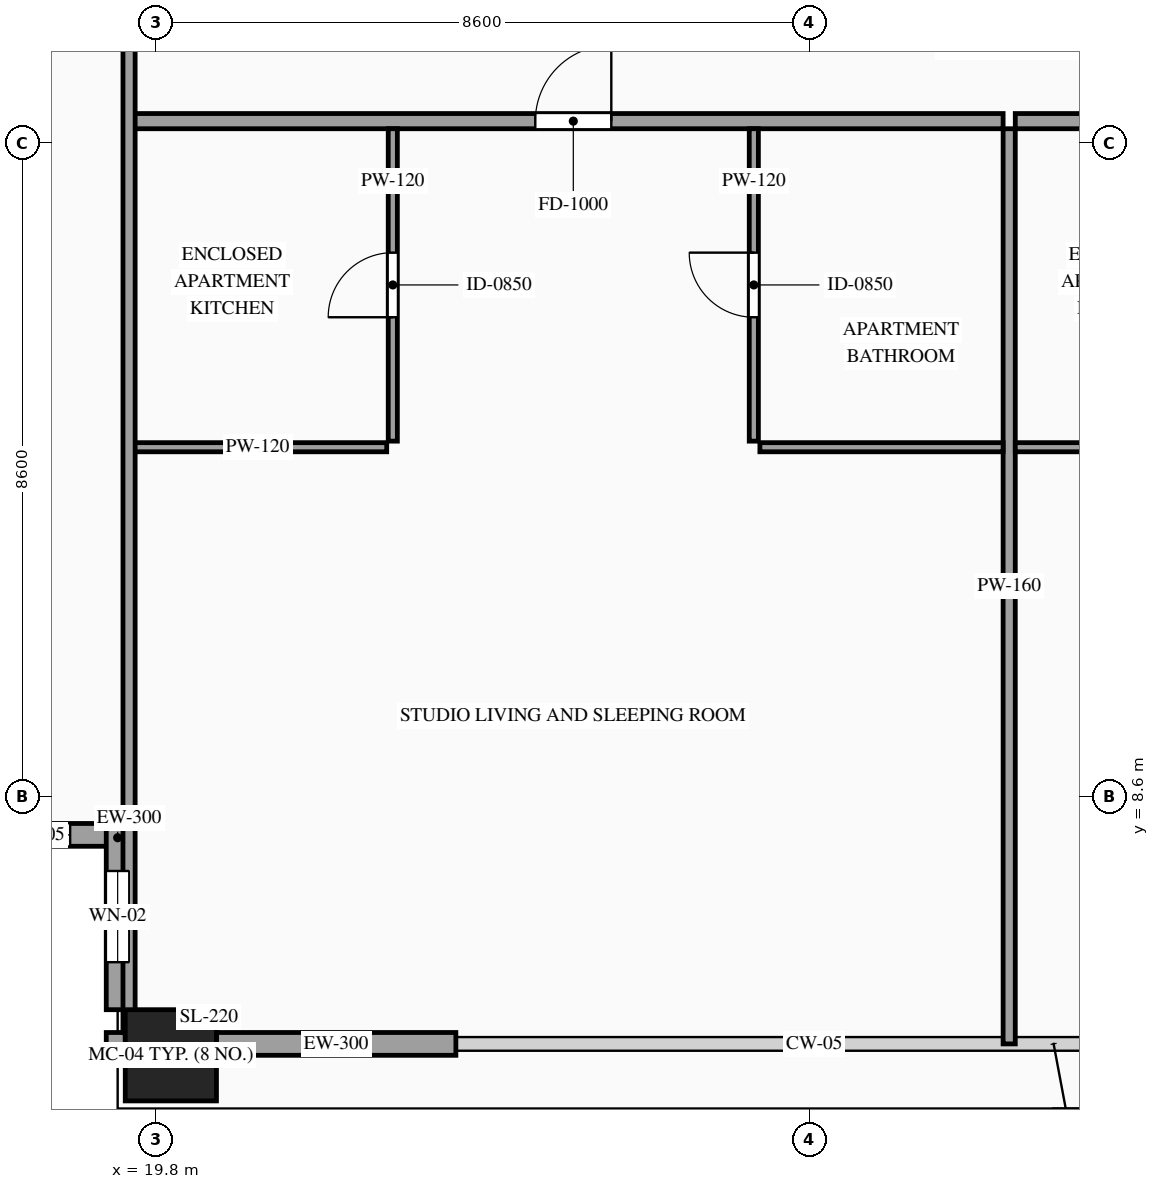
"""IFC4 building model, lengths in metres.
Left out: names, types, materials, properties, quantities, classifications, styles, units other than length and angle.
Written with IfcOpenShell. Run it as: python <this file> out.ifc"""

import sys

from ifc_helpers import new_model, si_unit, direction, frame, frame_2d, origin, origin_2d, place, context, subcontext, project, spatial, rectangle, hollow_rectangle, extrude, source, transform, mapped, element, fill, save


model = new_model("IFC4")
c1 = context("Model", 3, precision=1e-05, world=origin(), true_north=direction((0.0, 1.0)))
c2 = subcontext(c1, "Body", "Model", "MODEL_VIEW")
j1 = project(units=[si_unit("LENGTHUNIT", "METRE"), si_unit("PLANEANGLEUNIT", "RADIAN")], contexts=[c1])
p1 = place(None, origin())
s1 = spatial("IfcSite", under=j1, at=p1, CompositionType="ELEMENT")
p2 = place(p1, origin())
s2 = spatial("IfcBuilding", under=s1, at=p2, CompositionType="ELEMENT")
p3 = place(p2, frame((0.0, 0.0, 234.6)))
s3 = spatial("IfcBuildingStorey", under=s2, at=p3, CompositionType="ELEMENT", Elevation=234.6)
m1 = source(origin(), c2, "Body", "SweptSolid", [
    extrude(hollow_rectangle(XDim=1.2, YDim=1.2, WallThickness=0.055, at=origin_2d()), origin(), (0.0, 0.0, 1.0), 3.5),
])
p4 = place(p3, frame((20.0, 5.2, 0.0), z_axis=(0.0, 0.0, 1.0), x_axis=(1.0, 0.0, 0.0)))
e1 = element("IfcColumn", 1, at=p4, inside=s3, PredefinedType="COLUMN", context=c2, shape_type="MappedRepresentation", body=[
    mapped(m1, transform((0.0, 0.0, 0.0), scale=1.0)),
])
p5 = place(p3, frame((17.0, 8.1, 0.0), z_axis=(0.0, 0.0, 1.0), x_axis=(1.0, 0.0, 0.0)))
e2 = element("IfcWall", 2, at=p5, inside=s3, PredefinedType="SOLIDWALL", context=c2, shape_type="SweptSolid", body=[
    extrude(rectangle(XDim=2.45, YDim=0.3, at=frame_2d((1.225, 0.0))), origin(), (0.0, 0.0, 1.0), 3.28),
])
p6 = place(p5, frame((0.775, 0.0, 0.85)))
e3 = element("IfcOpeningElement", 3, at=p6, cuts=e2, PredefinedType="OPENING", context=c2, shape_type="SweptSolid", body=[
    extrude(rectangle(XDim=0.9, YDim=1.5, at=frame_2d((0.45, 0.75))), frame((0.0, 0.165, 0.0), z_axis=(0.0, -1.0, 0.0), x_axis=(1.0, 0.0, 0.0)), (0.0, 0.0, 1.0), 0.33),
])
p7 = place(p3, frame((19.3, 8.25, 0.0), z_axis=(0.0, 0.0, 1.0), x_axis=(0.0, -1.0, 0.0)))
e4 = element("IfcWall", 4, at=p7, inside=s3, PredefinedType="SOLIDWALL", context=c2, shape_type="SweptSolid", body=[
    extrude(rectangle(XDim=2.45, YDim=0.3, at=frame_2d((1.225, 0.0))), origin(), (0.0, 0.0, 1.0), 3.28),
])
p8 = place(p7, frame((0.625, 0.0, 0.85)))
e5 = element("IfcOpeningElement", 5, at=p8, cuts=e4, PredefinedType="OPENING", context=c2, shape_type="SweptSolid", body=[
    extrude(rectangle(XDim=1.2, YDim=2.1, at=frame_2d((0.6, 1.05))), frame((0.0, 0.165, 0.0), z_axis=(0.0, -1.0, 0.0), x_axis=(1.0, 0.0, 0.0)), (0.0, 0.0, 1.0), 0.33),
])
m2 = source(origin(), c2, "Body", "SweptSolid", [
    extrude(rectangle(XDim=0.25, YDim=0.3, at=frame_2d((0.125, 0.0))), origin(), (0.0, 0.0, 1.0), 3.28),
])
p9 = place(p3, frame((19.15, 5.35, 0.0), z_axis=(0.0, 0.0, 1.0), x_axis=(1.0, 0.0, 0.0)))
e6 = element("IfcWall", 6, at=p9, inside=s3, PredefinedType="SOLIDWALL", context=c2, shape_type="MappedRepresentation", body=[
    mapped(m2, transform((0.0, 0.0, 0.0), scale=1.0)),
])
m3 = source(origin(), c2, "Body", "SweptSolid", [
    extrude(rectangle(XDim=3.15, YDim=0.3, at=frame_2d((1.575, 0.0))), origin(), (0.0, 0.0, 1.0), 2.835),
])
p10 = place(p3, frame((20.6, 5.35, 0.0), z_axis=(0.0, 0.0, 1.0), x_axis=(1.0, 0.0, 0.0)))
e7 = element("IfcWall", 7, at=p10, inside=s3, PredefinedType="SOLIDWALL", context=c2, shape_type="MappedRepresentation", body=[
    mapped(m3, transform((0.0, 0.0, 0.0), scale=1.0)),
])
p11 = place(p3, frame((19.44, 17.49, 0.0), z_axis=(0.0, 0.0, 1.0), x_axis=(1.0, 0.0, 0.0)))
e8 = element("IfcWall", 8, at=p11, inside=s3, PredefinedType="PARTITIONING", context=c2, shape_type="SweptSolid", body=[
    extrude(rectangle(XDim=11.51, YDim=0.2, at=frame_2d((5.755, 0.0))), origin(), (0.0, 0.0, 1.0), 3.28),
])
p12 = place(p11, frame((5.355, 0.0, 0.0)))
e9 = element("IfcOpeningElement", 9, at=p12, cuts=e8, PredefinedType="OPENING", context=c2, shape_type="SweptSolid", body=[
    extrude(rectangle(XDim=1.0, YDim=2.2, at=frame_2d((0.5, 1.1))), frame((0.0, 0.115, 0.0), z_axis=(0.0, -1.0, 0.0), x_axis=(1.0, 0.0, 0.0)), (0.0, 0.0, 1.0), 0.23),
])
m4 = source(origin(), c2, "Body", "SweptSolid", [
    extrude(rectangle(XDim=12.04, YDim=0.16, at=frame_2d((6.02, 0.0))), origin(), (0.0, 0.0, 1.0), 3.28),
])
p13 = place(p3, frame((31.03, 5.35, 0.0), z_axis=(0.0, 0.0, 1.0), x_axis=(0.0, 1.0, 0.0)))
e10 = element("IfcWall", 10, at=p13, inside=s3, PredefinedType="PARTITIONING", context=c2, shape_type="MappedRepresentation", body=[
    mapped(m4, transform((0.0, 0.0, 0.0), scale=1.0)),
])
m5 = source(origin(), c2, "Body", "SweptSolid", [
    extrude(rectangle(XDim=3.4, YDim=0.12, at=frame_2d((1.7, 0.0))), origin(), (0.0, 0.0, 1.0), 3.28),
])
p14 = place(p3, frame((19.44, 13.2, 0.0), z_axis=(0.0, 0.0, 1.0), x_axis=(1.0, 0.0, 0.0)))
e11 = element("IfcWall", 11, at=p14, inside=s3, PredefinedType="PARTITIONING", context=c2, shape_type="MappedRepresentation", body=[
    mapped(m5, transform((0.0, 0.0, 0.0), scale=1.0)),
])
p15 = place(p3, frame((22.92, 13.28, 0.0), z_axis=(0.0, 0.0, 1.0), x_axis=(0.0, 1.0, 0.0)))
e12 = element("IfcWall", 12, at=p15, inside=s3, PredefinedType="PARTITIONING", context=c2, shape_type="SweptSolid", body=[
    extrude(rectangle(XDim=4.11, YDim=0.12, at=frame_2d((2.055, 0.0))), origin(), (0.0, 0.0, 1.0), 3.28),
])
p16 = place(p15, frame((1.63, 0.0, 0.0)))
e13 = element("IfcOpeningElement", 13, at=p16, cuts=e12, PredefinedType="OPENING", context=c2, shape_type="SweptSolid", body=[
    extrude(rectangle(XDim=0.85, YDim=2.1, at=frame_2d((0.425, 1.05))), frame((0.0, 0.075, 0.0), z_axis=(0.0, -1.0, 0.0), x_axis=(1.0, 0.0, 0.0)), (0.0, 0.0, 1.0), 0.15),
])
m6 = source(origin(), c2, "Body", "SweptSolid", [
    extrude(rectangle(XDim=3.2, YDim=0.12, at=frame_2d((1.6, 0.0))), origin(), (0.0, 0.0, 1.0), 3.28),
])
p17 = place(p3, frame((27.75, 13.2, 0.0), z_axis=(0.0, 0.0, 1.0), x_axis=(1.0, 0.0, 0.0)))
e14 = element("IfcWall", 14, at=p17, inside=s3, PredefinedType="PARTITIONING", context=c2, shape_type="MappedRepresentation", body=[
    mapped(m6, transform((0.0, 0.0, 0.0), scale=1.0)),
])
p18 = place(p3, frame((27.67, 13.28, 0.0), z_axis=(0.0, 0.0, 1.0), x_axis=(0.0, 1.0, 0.0)))
e15 = element("IfcWall", 15, at=p18, inside=s3, PredefinedType="PARTITIONING", context=c2, shape_type="SweptSolid", body=[
    extrude(rectangle(XDim=4.11, YDim=0.12, at=frame_2d((2.055, 0.0))), origin(), (0.0, 0.0, 1.0), 3.28),
])
p19 = place(p18, frame((1.63, 0.0, 0.0)))
e16 = element("IfcOpeningElement", 16, at=p19, cuts=e15, PredefinedType="OPENING", context=c2, shape_type="SweptSolid", body=[
    extrude(rectangle(XDim=0.85, YDim=2.1, at=frame_2d((0.425, 1.05))), frame((0.0, 0.075, 0.0), z_axis=(0.0, -1.0, 0.0), x_axis=(1.0, 0.0, 0.0)), (0.0, 0.0, 1.0), 0.15),
])
p20 = place(p3, frame((31.11, 17.49, 0.0), z_axis=(0.0, 0.0, 1.0), x_axis=(1.0, 0.0, 0.0)))
e17 = element("IfcWall", 17, at=p20, inside=s3, PredefinedType="PARTITIONING", context=c2, shape_type="SweptSolid", body=[
    extrude(rectangle(XDim=11.429, YDim=0.2, at=frame_2d((5.714, 0.0))), origin(), (0.0, 0.0, 1.0), 3.28),
])
p21 = place(p20, frame((5.314, 0.0, 0.0)))
e18 = element("IfcOpeningElement", 18, at=p21, cuts=e17, PredefinedType="OPENING", context=c2, shape_type="SweptSolid", body=[
    extrude(rectangle(XDim=1.0, YDim=2.2, at=frame_2d((0.5, 1.1))), frame((0.0, 0.115, 0.0), z_axis=(0.0, -1.0, 0.0), x_axis=(1.0, 0.0, 0.0)), (0.0, 0.0, 1.0), 0.23),
])
m7 = source(origin(), c2, "Body", "SweptSolid", [
    extrude(rectangle(XDim=3.4, YDim=0.12, at=frame_2d((1.7, 0.0))), origin(), (0.0, 0.0, 1.0), 3.28),
])
p22 = place(p3, frame((31.11, 13.2, 0.0), z_axis=(0.0, 0.0, 1.0), x_axis=(1.0, 0.0, 0.0)))
e19 = element("IfcWall", 19, at=p22, inside=s3, PredefinedType="PARTITIONING", context=c2, shape_type="MappedRepresentation", body=[
    mapped(m7, transform((0.0, 0.0, 0.0), scale=1.0)),
])
m8 = source(origin(), c2, "Body", "SweptSolid", [
    extrude(rectangle(XDim=26.69, YDim=0.16, at=frame_2d((13.345, 0.0))), origin(), (0.0, 0.0, 1.0), 3.28),
])
p23 = place(p3, frame((19.45, 5.5, 0.0), z_axis=(0.0, 0.0, 1.0), x_axis=(0.0, 1.0, 0.0)))
e20 = element("IfcWall", 20, at=p23, inside=s3, PredefinedType="PARTITIONING", context=c2, shape_type="MappedRepresentation", body=[
    mapped(m8, transform((0.0, 0.0, 0.0), scale=1.0)),
])
m9 = source(origin(), c2, "Body", "SweptSolid", [
    extrude(rectangle(XDim=0.9, YDim=1.5, at=frame_2d((0.45, 0.75))), frame((0.0, 0.03, 0.0), z_axis=(0.0, -1.0, 0.0), x_axis=(1.0, 0.0, 0.0)), (0.0, 0.0, 1.0), 0.06),
])
p24 = place(p6, origin())
e21 = element("IfcWindow", 21, at=p24, inside=s3, PartitioningType="SINGLE_PANEL", PredefinedType="WINDOW", context=c2, shape_type="MappedRepresentation", body=[
    mapped(m9, transform((0.0, 0.0, 0.0), scale=1.0)),
])
fill(e3, e21)
m10 = source(origin(), c2, "Body", "SweptSolid", [
    extrude(rectangle(XDim=1.2, YDim=2.1, at=frame_2d((0.6, 1.05))), frame((0.0, 0.03, 0.0), z_axis=(0.0, -1.0, 0.0), x_axis=(1.0, 0.0, 0.0)), (0.0, 0.0, 1.0), 0.06),
])
p25 = place(p8, origin())
e22 = element("IfcWindow", 22, at=p25, inside=s3, PartitioningType="SINGLE_PANEL", PredefinedType="WINDOW", context=c2, shape_type="MappedRepresentation", body=[
    mapped(m10, transform((0.0, 0.0, 0.0), scale=1.0)),
])
fill(e5, e22)
m11 = source(origin(), c2, "Body", "SweptSolid", [
    extrude(rectangle(XDim=1.0, YDim=2.2, at=frame_2d((0.5, 1.1))), frame((0.0, 0.025, 0.0), z_axis=(0.0, -1.0, 0.0), x_axis=(1.0, 0.0, 0.0)), (0.0, 0.0, 1.0), 0.05),
])
p26 = place(p12, origin())
e23 = element("IfcDoor", 23, at=p26, inside=s3, OperationType="SINGLE_SWING_RIGHT", PredefinedType="DOOR", context=c2, shape_type="MappedRepresentation", body=[
    mapped(m11, transform((0.0, 0.0, 0.0), scale=1.0)),
])
fill(e9, e23)
m12 = source(origin(), c2, "Body", "SweptSolid", [
    extrude(rectangle(XDim=0.85, YDim=2.1, at=frame_2d((0.425, 1.05))), frame((0.0, 0.025, 0.0), z_axis=(0.0, -1.0, 0.0), x_axis=(1.0, 0.0, 0.0)), (0.0, 0.0, 1.0), 0.05),
])
p27 = place(p16, origin())
e24 = element("IfcDoor", 24, at=p27, inside=s3, OperationType="SINGLE_SWING_LEFT", PredefinedType="DOOR", context=c2, shape_type="MappedRepresentation", body=[
    mapped(m12, transform((0.0, 0.0, 0.0), scale=1.0)),
])
fill(e13, e24)
p28 = place(p19, origin())
e25 = element("IfcDoor", 25, at=p28, inside=s3, OperationType="SINGLE_SWING_RIGHT", PredefinedType="DOOR", context=c2, shape_type="MappedRepresentation", body=[
    mapped(m12, transform((0.0, 0.0, 0.0), scale=1.0)),
])
fill(e16, e25)
save(model, sys.argv[1])
